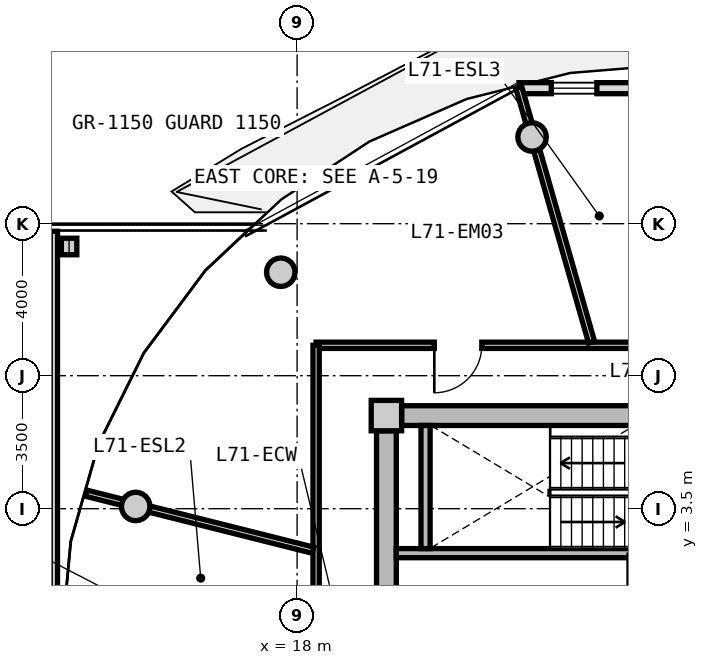
"""IFC4 building model, lengths in metres.
Left out: names, types, materials, properties, quantities, classifications, styles, units other than length and angle.
Written with IfcOpenShell. Run it as: python <this file> out.ifc"""

import sys

from ifc_helpers import new_model, si_unit, direction, frame, frame_2d, origin, origin_2d, place, context, subcontext, project, spatial, rectangle, circle, i_section, extrude, source, transform, mapped, element, fill, save


model = new_model("IFC4")
c1 = context("Model", 3, precision=1e-05, world=origin(), true_north=direction((0.0, 1.0)))
c2 = subcontext(c1, "Body", "Model", "MODEL_VIEW")
j1 = project(units=[si_unit("LENGTHUNIT", "METRE"), si_unit("PLANEANGLEUNIT", "RADIAN")], contexts=[c1])
p1 = place(None, origin())
s1 = spatial("IfcSite", under=j1, at=p1, CompositionType="ELEMENT")
p2 = place(p1, origin())
s2 = spatial("IfcBuilding", under=s1, at=p2, CompositionType="ELEMENT")
p3 = place(p2, frame((0.0, 0.0, 229.15)))
s3 = spatial("IfcBuildingStorey", under=s2, at=p3, CompositionType="ELEMENT", Elevation=229.15)
m1 = source(origin(), c2, "Body", "SweptSolid", [
    extrude(rectangle(XDim=0.8, YDim=0.8, at=origin_2d()), origin(), (0.0, 0.0, 1.0), 3.05),
])
p4 = place(p3, frame((20.35, 5.95, 0.0), z_axis=(0.0, 0.0, 1.0), x_axis=(1.0, 0.0, 0.0)))
e1 = element("IfcColumn", 1, at=p4, inside=s3, PredefinedType="COLUMN", context=c2, shape_type="MappedRepresentation", body=[
    mapped(m1, transform((0.0, 0.0, 0.0), x_axis=(1.0, 0.0, 0.0), y_axis=(0.0, 1.0, 0.0), z_axis=(0.0, 0.0, 1.0), scale=1.0)),
])
m2 = source(origin(), c2, "Body", "SweptSolid", [
    extrude(rectangle(XDim=14.5, YDim=0.52, at=frame_2d((7.25, 0.0))), origin(), (0.0, 0.0, 1.0), 2.81),
])
p5 = place(p3, frame((20.75, 5.95, 0.0), z_axis=(0.0, 0.0, 1.0), x_axis=(1.0, 0.0, 0.0)))
e2 = element("IfcWall", 2, at=p5, inside=s3, PredefinedType="SHEAR", context=c2, shape_type="MappedRepresentation", body=[
    mapped(m2, transform((0.0, 0.0, 0.0), x_axis=(1.0, 0.0, 0.0), y_axis=(0.0, 1.0, 0.0), z_axis=(0.0, 0.0, 1.0), scale=1.0)),
])
m3 = source(origin(), c2, "Body", "SweptSolid", [
    extrude(rectangle(XDim=11.1, YDim=0.52, at=frame_2d((5.55, 0.0))), origin(), (0.0, 0.0, 1.0), 2.81),
])
p6 = place(p3, frame((20.35, -5.55, 0.0), z_axis=(0.0, 0.0, 1.0), x_axis=(0.0, 1.0, 0.0)))
e3 = element("IfcWall", 3, at=p6, inside=s3, PredefinedType="SHEAR", context=c2, shape_type="MappedRepresentation", body=[
    mapped(m3, transform((0.0, 0.0, 0.0), x_axis=(1.0, 0.0, 0.0), y_axis=(0.0, 1.0, 0.0), z_axis=(0.0, 0.0, 1.0), scale=1.0)),
])
p7 = place(p6, frame((3.8, 0.0, 0.0)))
e4 = element("IfcOpeningElement", 4, at=p7, cuts=e3, PredefinedType="OPENING", context=c2, shape_type="SweptSolid", body=[
    extrude(rectangle(XDim=1.2, YDim=2.15, at=frame_2d((0.6, 1.075))), frame((0.0, 0.27, 0.0), z_axis=(0.0, -1.0, 0.0), x_axis=(1.0, 0.0, 0.0)), (0.0, 0.0, 1.0), 0.54),
])
m4 = source(origin(), c2, "Body", "SweptSolid", [
    extrude(circle(Radius=0.375, at=origin_2d()), origin(), (0.0, 0.0, 1.0), 3.05),
])
for number, where, z_axis, x_axis in (
    (5, (24.182, 13.281, 0.0), (0.0, 0.0, 1.0), (1.0, 0.0, 0.0)),
    (6, (17.57, 9.723, 0.0), (0.0, 0.0, 1.0), (1.0, 0.0, 0.0)),
    (7, (13.753, 3.559, 0.0), (0.0, 0.0, 1.0), (1.0, 0.0, 0.0)),
):
    element("IfcColumn", number, at=place(p3, frame(where, z_axis=z_axis, x_axis=x_axis)), inside=s3, PredefinedType="COLUMN", context=c2, shape_type="MappedRepresentation", body=[
        mapped(m4, transform((0.0, 0.0, 0.0), x_axis=(1.0, 0.0, 0.0), y_axis=(0.0, 1.0, 0.0), z_axis=(0.0, 0.0, 1.0), scale=1.0)),
    ])
m5 = source(origin(), c2, "Body", "SweptSolid", [
    extrude(i_section(OverallWidth=0.407, OverallDepth=0.435, WebThickness=0.024, FlangeThickness=0.039, FilletRadius=0.015, at=origin_2d()), origin(), (0.0, 0.0, 1.0), 3.05),
])
p8 = place(p3, frame((12.0, 10.4, 0.0), z_axis=(0.0, 0.0, 1.0), x_axis=(1.0, 0.0, 0.0)))
e8 = element("IfcColumn", 8, at=p8, inside=s3, PredefinedType="COLUMN", context=c2, shape_type="MappedRepresentation", body=[
    mapped(m5, transform((0.0, 0.0, 0.0), x_axis=(1.0, 0.0, 0.0), y_axis=(0.0, 1.0, 0.0), z_axis=(0.0, 0.0, 1.0), scale=1.0)),
])
m6 = source(origin(), c2, "Body", "SweptSolid", [
    extrude(rectangle(XDim=8.324, YDim=0.29, at=frame_2d((4.162, 0.0))), origin(), (0.0, 0.0, 1.0), 2.81),
])
p9 = place(p3, frame((23.838, 14.566, 0.0), z_axis=(0.0, 0.0, 1.0), x_axis=(1.0, 0.0, 0.0)))
e9 = element("IfcWall", 9, at=p9, inside=s3, PredefinedType="SOLIDWALL", context=c2, shape_type="MappedRepresentation", body=[
    mapped(m6, transform((0.0, 0.0, 0.0), x_axis=(1.0, 0.0, 0.0), y_axis=(0.0, 1.0, 0.0), z_axis=(0.0, 0.0, 1.0), scale=1.0)),
])
p10 = place(p9, frame((6.26, 0.0, 0.0)))
e10 = element("IfcOpeningElement", 10, at=p10, cuts=e9, PredefinedType="OPENING", context=c2, shape_type="SweptSolid", body=[
    extrude(rectangle(XDim=1.15, YDim=2.25, at=frame_2d((0.575, 1.125))), frame((0.0, 0.155, 0.0), z_axis=(0.0, -1.0, 0.0), x_axis=(1.0, 0.0, 0.0)), (0.0, 0.0, 1.0), 0.31),
])
p11 = place(p9, frame((0.85, 0.0, 0.85)))
e11 = element("IfcOpeningElement", 11, at=p11, cuts=e9, PredefinedType="OPENING", context=c2, shape_type="SweptSolid", body=[
    extrude(rectangle(XDim=1.2, YDim=1.5, at=frame_2d((0.6, 0.75))), frame((0.0, 0.155, 0.0), z_axis=(0.0, -1.0, 0.0), x_axis=(1.0, 0.0, 0.0)), (0.0, 0.0, 1.0), 0.31),
])
m7 = source(origin(), c2, "Body", "SweptSolid", [
    extrude(rectangle(XDim=7.93, YDim=0.24, at=frame_2d((3.965, 0.0))), origin(), (0.0, 0.0, 1.0), 2.81),
])
p12 = place(p3, frame((20.61, 2.33, 0.0), z_axis=(0.0, 0.0, 1.0), x_axis=(1.0, 0.0, 0.0)))
e12 = element("IfcWall", 12, at=p12, inside=s3, PredefinedType="PARTITIONING", context=c2, shape_type="MappedRepresentation", body=[
    mapped(m7, transform((0.0, 0.0, 0.0), x_axis=(1.0, 0.0, 0.0), y_axis=(0.0, 1.0, 0.0), z_axis=(0.0, 0.0, 1.0), scale=1.0)),
])
m8 = source(origin(), c2, "Body", "SweptSolid", [
    extrude(rectangle(XDim=3.24, YDim=0.24, at=frame_2d((1.62, 0.0))), origin(), (0.0, 0.0, 1.0), 2.81),
])
p13 = place(p3, frame((21.38, 2.45, 0.0), z_axis=(0.0, 0.0, 1.0), x_axis=(0.0, 1.0, 0.0)))
e13 = element("IfcWall", 13, at=p13, inside=s3, PredefinedType="PARTITIONING", context=c2, shape_type="MappedRepresentation", body=[
    mapped(m8, transform((0.0, 0.0, 0.0), x_axis=(1.0, 0.0, 0.0), y_axis=(0.0, 1.0, 0.0), z_axis=(0.0, 0.0, 1.0), scale=1.0)),
])
m9 = source(origin(), c2, "Body", "SweptSolid", [
    extrude(rectangle(XDim=8.58, YDim=0.165, at=frame_2d((4.29, 0.0))), origin(), (0.0, 0.0, 1.0), 2.795),
])
p14 = place(p3, frame((18.5, 7.8, 0.0), z_axis=(0.0, 0.0, 1.0), x_axis=(1.0, 0.0, 0.0)))
e14 = element("IfcWall", 14, at=p14, inside=s3, PredefinedType="PARTITIONING", context=c2, shape_type="MappedRepresentation", body=[
    mapped(m9, transform((0.0, 0.0, 0.0), x_axis=(1.0, 0.0, 0.0), y_axis=(0.0, 1.0, 0.0), z_axis=(0.0, 0.0, 1.0), scale=1.0)),
])
p15 = place(p14, frame((3.11, 0.0, 0.0)))
e15 = element("IfcOpeningElement", 15, at=p15, cuts=e14, PredefinedType="OPENING", context=c2, shape_type="SweptSolid", body=[
    extrude(rectangle(XDim=1.25, YDim=2.2, at=frame_2d((0.625, 1.1))), frame((0.0, 0.093, 0.0), z_axis=(0.0, -1.0, 0.0), x_axis=(1.0, 0.0, 0.0)), (0.0, 0.0, 1.0), 0.185),
])
m10 = source(origin(), c2, "Body", "SweptSolid", [
    extrude(rectangle(XDim=6.88, YDim=0.165, at=frame_2d((3.44, 0.0))), origin(), (0.0, 0.0, 1.0), 2.795),
])
p16 = place(p3, frame((18.5, 0.92, 0.0), z_axis=(0.0, 0.0, 1.0), x_axis=(0.0, 1.0, 0.0)))
e16 = element("IfcWall", 16, at=p16, inside=s3, PredefinedType="PARTITIONING", context=c2, shape_type="MappedRepresentation", body=[
    mapped(m10, transform((0.0, 0.0, 0.0), x_axis=(1.0, 0.0, 0.0), y_axis=(0.0, 1.0, 0.0), z_axis=(0.0, 0.0, 1.0), scale=1.0)),
])
m11 = source(origin(), c2, "Body", "SweptSolid", [
    extrude(rectangle(XDim=6.974, YDim=0.165, at=frame_2d((3.487, 0.0))), origin(), (0.0, 0.0, 1.0), 2.395),
])
p17 = place(p3, frame((25.749, 7.88, 0.0), z_axis=(0.0, 0.0, 1.0), x_axis=(-0.274707256801, 0.961527910703, 0.0)))
e17 = element("IfcWall", 17, at=p17, inside=s3, PredefinedType="PARTITIONING", context=c2, shape_type="MappedRepresentation", body=[
    mapped(m11, transform((0.0, 0.0, 0.0), x_axis=(1.0, 0.0, 0.0), y_axis=(0.0, 1.0, 0.0), z_axis=(0.0, 0.0, 1.0), scale=1.0)),
])
m12 = source(origin(), c2, "Body", "SweptSolid", [
    extrude(rectangle(XDim=6.157, YDim=0.165, at=frame_2d((3.079, 0.0))), origin(), (0.0, 0.0, 1.0), 2.395),
])
p18 = place(p3, frame((18.42, 2.407, 0.0), z_axis=(0.0, 0.0, 1.0), x_axis=(-0.969840867184, 0.243738984038, 0.0)))
e18 = element("IfcWall", 18, at=p18, inside=s3, PredefinedType="PARTITIONING", context=c2, shape_type="MappedRepresentation", body=[
    mapped(m12, transform((0.0, 0.0, 0.0), x_axis=(1.0, 0.0, 0.0), y_axis=(0.0, 1.0, 0.0), z_axis=(0.0, 0.0, 1.0), scale=1.0)),
])
m13 = source(origin(), c2, "Body", "SweptSolid", [
    extrude(rectangle(XDim=9.88, YDim=0.19, at=frame_2d((4.94, 0.0))), origin(), (0.0, 0.0, 1.0), 2.795),
])
p19 = place(p3, frame((11.6, 0.92, 0.0), z_axis=(0.0, 0.0, 1.0), x_axis=(0.0, 1.0, 0.0)))
e19 = element("IfcWall", 19, at=p19, inside=s3, PredefinedType="PARTITIONING", context=c2, shape_type="MappedRepresentation", body=[
    mapped(m13, transform((0.0, 0.0, 0.0), x_axis=(1.0, 0.0, 0.0), y_axis=(0.0, 1.0, 0.0), z_axis=(0.0, 0.0, 1.0), scale=1.0)),
])
m14 = source(origin(), c2, "Body", "SweptSolid", [
    extrude(rectangle(XDim=1.2, YDim=1.5, at=frame_2d((0.6, 0.75))), frame((0.0, 0.03, 0.0), z_axis=(0.0, -1.0, 0.0), x_axis=(1.0, 0.0, 0.0)), (0.0, 0.0, 1.0), 0.06),
])
p20 = place(p11, origin())
e20 = element("IfcWindow", 20, at=p20, inside=s3, PartitioningType="SINGLE_PANEL", PredefinedType="WINDOW", context=c2, shape_type="MappedRepresentation", body=[
    mapped(m14, transform((0.0, 0.0, 0.0), x_axis=(1.0, 0.0, 0.0), y_axis=(0.0, 1.0, 0.0), z_axis=(0.0, 0.0, 1.0), scale=1.0)),
])
fill(e11, e20)
m15 = source(origin(), c2, "Body", "SweptSolid", [
    extrude(rectangle(XDim=1.25, YDim=2.2, at=frame_2d((0.625, 1.1))), frame((0.0, 0.025, 0.0), z_axis=(0.0, -1.0, 0.0), x_axis=(1.0, 0.0, 0.0)), (0.0, 0.0, 1.0), 0.05),
])
p21 = place(p15, frame((1.25, 0.0, 0.0), z_axis=(0.0, 0.0, 1.0), x_axis=(-1.0, 0.0, 0.0)))
e21 = element("IfcDoor", 21, at=p21, inside=s3, OperationType="SINGLE_SWING_RIGHT", PredefinedType="DOOR", context=c2, shape_type="MappedRepresentation", body=[
    mapped(m15, transform((0.0, 0.0, 0.0), x_axis=(1.0, 0.0, 0.0), y_axis=(0.0, 1.0, 0.0), z_axis=(0.0, 0.0, 1.0), scale=1.0)),
])
fill(e15, e21)
save(model, sys.argv[1])
